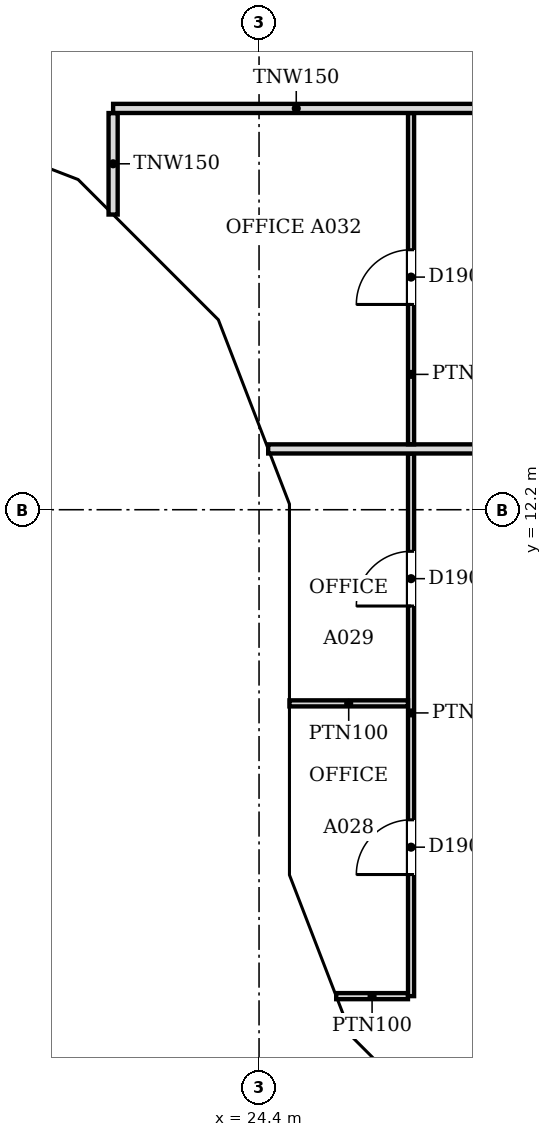
"""IFC4 building model, lengths in metres.
Left out: names, types, materials, properties, quantities, classifications, styles, units other than length and angle.
Written with IfcOpenShell. Run it as: python <this file> out.ifc"""

import sys

from ifc_helpers import new_model, si_unit, direction, frame, frame_2d, origin, place, context, subcontext, project, spatial, polyline, rectangle, outline, extrude, faceted_brep, source, transform, mapped, element, fill, save


model = new_model("IFC4")
c1 = context("Model", 3, precision=1e-05, world=origin(), true_north=direction((0.0, 1.0)))
c2 = subcontext(c1, "Body", "Model", "MODEL_VIEW")
j1 = project(units=[si_unit("LENGTHUNIT", "METRE"), si_unit("PLANEANGLEUNIT", "RADIAN")], contexts=[c1])
p1 = place(None, origin())
s1 = spatial("IfcSite", under=j1, at=p1, CompositionType="ELEMENT")
p2 = place(p1, origin())
s2 = spatial("IfcBuilding", under=s1, at=p2, CompositionType="ELEMENT")
p3 = place(p2, frame((0.0, 0.0, 159.2)))
s3 = spatial("IfcBuildingStorey", under=s2, at=p3, CompositionType="ELEMENT", Elevation=159.2)
m1 = source(origin(), c2, "Body", "Brep", [
    faceted_brep([(3.096, -0.25, 7.536), (0.047, -0.25, 3.856), (0.047, -0.25, 3.744), (3.096, -0.25, 0.064), (0.0, 0.25, 3.8), (3.149, 0.25, 7.6), (3.202, 0.25, 7.536), (3.202, 0.25, 0.064), (3.149, 0.25, 0.0), (3.149, -0.0, 0.0), (3.149, -0.0, 7.6), (0.0, 0.0, 3.8)], [[[0, 1, 2, 3]], [[4, 5, 6, 7, 8]], [[8, 7, 9]], [[6, 5, 10]], [[5, 4, 11, 1, 0, 10]], [[4, 8, 9, 3, 2, 11]], [[11, 2, 1]], [[3, 9, 7, 6, 10, 0]]]),
])
p4 = place(p3, frame((18.346, 18.55, -3.8), z_axis=(0.0, 0.0, 1.0), x_axis=(0.932985567668, -0.359913782069, 0.0)))
e1 = element("IfcWall", 1, at=p4, inside=s3, PredefinedType="SOLIDWALL", context=c2, shape_type="MappedRepresentation", body=[
    mapped(m1, transform((0.0, 0.0, 0.0), scale=1.0)),
])
m2 = source(origin(), c2, "Body", "SweptSolid", [
    extrude(outline(polyline([(2.949, 6.967), (0.325, 3.8), (2.949, 0.633), (2.949, 6.967)])), frame((0.0, 0.26, 0.0), z_axis=(0.0, -1.0, 0.0), x_axis=(1.0, 0.0, 0.0)), (0.0, 0.0, 1.0), 0.52),
])
p5 = place(p4, origin())
e2 = element("IfcOpeningElement", 2, at=p5, cuts=e1, PredefinedType="OPENING", context=c2, shape_type="MappedRepresentation", body=[
    mapped(m2, transform((0.0, 0.0, 0.0), scale=1.0)),
])
m3 = source(origin(), c2, "Body", "Brep", [
    faceted_brep([(0.106, -0.25, 0.064), (3.156, -0.25, 3.736), (3.156, -0.25, 3.864), (0.106, -0.25, 7.536), (0.0, 0.25, 7.536), (0.053, 0.25, 7.6), (3.209, 0.25, 3.8), (0.053, 0.25, 0.0), (0.0, 0.25, 0.064), (3.209, -0.0, 3.8), (0.053, 0.0, 0.0), (0.053, 0.0, 7.6)], [[[0, 1, 2, 3]], [[4, 5, 6, 7, 8]], [[7, 6, 9, 1, 0, 10]], [[6, 5, 11, 3, 2, 9]], [[5, 4, 11]], [[8, 7, 10]], [[8, 10, 0, 3, 11, 4]], [[1, 9, 2]]]),
])
p6 = place(p3, frame((21.248, 17.454, -3.8), z_axis=(0.0, 0.0, 1.0), x_axis=(0.707106781187, -0.707106781187, 0.0)))
e3 = element("IfcWall", 3, at=p6, inside=s3, PredefinedType="SOLIDWALL", context=c2, shape_type="MappedRepresentation", body=[
    mapped(m3, transform((0.0, 0.0, 0.0), scale=1.0)),
])
m4 = source(origin(), c2, "Body", "SweptSolid", [
    extrude(outline(polyline([(0.253, 0.632), (2.884, 3.8), (0.253, 6.968), (0.253, 0.632)])), frame((0.0, 0.26, 0.0), z_axis=(0.0, -1.0, 0.0), x_axis=(1.0, 0.0, 0.0)), (0.0, 0.0, 1.0), 0.52),
])
p7 = place(p6, origin())
e4 = element("IfcOpeningElement", 4, at=p7, cuts=e3, PredefinedType="OPENING", context=c2, shape_type="MappedRepresentation", body=[
    mapped(m4, transform((0.0, 0.0, 0.0), scale=1.0)),
])
m5 = source(origin(), c2, "Body", "Brep", [
    faceted_brep([(3.103, -0.25, 7.544), (0.053, -0.25, 3.864), (0.053, -0.25, 3.736), (3.103, -0.25, 0.056), (0.0, 0.25, 3.8), (3.149, 0.25, 7.6), (3.196, 0.25, 7.543), (3.196, 0.25, 0.057), (3.149, 0.25, 0.0), (3.149, -0.0, 0.0), (3.149, -0.0, 7.6), (0.0, 0.0, 3.8)], [[[0, 1, 2, 3]], [[4, 5, 6, 7, 8]], [[8, 7, 9]], [[6, 5, 10]], [[5, 4, 11, 1, 0, 10]], [[4, 8, 9, 3, 2, 11]], [[11, 2, 1]], [[3, 9, 7, 6, 10, 0]]]),
])
p8 = place(p3, frame((23.517, 15.185, -3.8), z_axis=(0.0, 0.0, 1.0), x_axis=(0.359864468756, -0.933004589553, 0.0)))
e5 = element("IfcWall", 5, at=p8, inside=s3, PredefinedType="SOLIDWALL", context=c2, shape_type="MappedRepresentation", body=[
    mapped(m5, transform((0.0, 0.0, 0.0), scale=1.0)),
])
p9 = place(p8, origin())
e6 = element("IfcOpeningElement", 6, at=p9, cuts=e5, PredefinedType="OPENING", context=c2, shape_type="MappedRepresentation", body=[
    mapped(m2, transform((0.0, 0.0, 0.0), scale=1.0)),
])
m6 = source(origin(), c2, "Body", "Brep", [
    faceted_brep([(0.093, -0.25, 0.057), (3.143, -0.25, 3.8), (0.093, -0.25, 7.543), (0.0, 0.25, 7.544), (0.047, 0.25, 7.6), (3.143, 0.25, 3.8), (0.047, 0.25, 0.0), (0.0, 0.25, 0.056), (0.047, 0.0, 0.0), (0.047, 0.0, 7.6)], [[[0, 1, 2]], [[3, 4, 5, 6, 7]], [[6, 5, 1, 0, 8]], [[5, 4, 9, 2, 1]], [[4, 3, 9]], [[7, 6, 8]], [[7, 8, 0, 2, 9, 3]]]),
])
p10 = place(p3, frame((24.65, 12.293, -3.8), z_axis=(0.0, 0.0, 1.0), x_axis=(0.0, -1.0, 0.0)))
e7 = element("IfcWall", 7, at=p10, inside=s3, PredefinedType="SOLIDWALL", context=c2, shape_type="MappedRepresentation", body=[
    mapped(m6, transform((0.0, 0.0, 0.0), scale=1.0)),
])
m7 = source(origin(), c2, "Body", "SweptSolid", [
    extrude(outline(polyline([(0.247, 0.641), (2.821, 3.8), (0.247, 6.959), (0.247, 0.641)])), frame((0.0, 0.26, 0.0), z_axis=(0.0, -1.0, 0.0), x_axis=(1.0, 0.0, 0.0)), (0.0, 0.0, 1.0), 0.52),
])
p11 = place(p10, origin())
e8 = element("IfcOpeningElement", 8, at=p11, cuts=e7, PredefinedType="OPENING", context=c2, shape_type="MappedRepresentation", body=[
    mapped(m7, transform((0.0, 0.0, 0.0), scale=1.0)),
])
m8 = source(origin(), c2, "Body", "Brep", [
    faceted_brep([(3.003, -0.25, 0.0), (3.05, -0.25, 0.06), (3.05, -0.25, 7.54), (3.003, -0.25, 7.6), (0.0, -0.25, 3.8), (0.0, 0.25, 3.8), (2.957, 0.25, 7.541), (2.957, 0.25, 0.059), (3.003, 0.0, 0.0), (3.003, 0.0, 7.6)], [[[0, 1, 2, 3, 4]], [[5, 6, 7]], [[1, 0, 8]], [[9, 3, 2]], [[6, 5, 4, 3, 9]], [[5, 7, 8, 0, 4]], [[1, 8, 7, 6, 9, 2]]]),
])
p12 = place(p3, frame((24.65, 9.15, -3.8), z_axis=(0.0, 0.0, 1.0), x_axis=(0.0, -1.0, 0.0)))
e9 = element("IfcWall", 9, at=p12, inside=s3, PredefinedType="SOLIDWALL", context=c2, shape_type="MappedRepresentation", body=[
    mapped(m8, transform((0.0, 0.0, 0.0), scale=1.0)),
])
m9 = source(origin(), c2, "Body", "SweptSolid", [
    extrude(outline(polyline([(2.803, 6.944), (0.319, 3.8), (2.803, 0.656), (2.803, 6.944)])), frame((0.0, 0.26, 0.0), z_axis=(0.0, -1.0, 0.0), x_axis=(1.0, 0.0, 0.0)), (0.0, 0.0, 1.0), 0.52),
])
p13 = place(p12, origin())
e10 = element("IfcOpeningElement", 10, at=p13, cuts=e9, PredefinedType="OPENING", context=c2, shape_type="MappedRepresentation", body=[
    mapped(m9, transform((0.0, 0.0, 0.0), scale=1.0)),
])
m10 = source(origin(), c2, "Body", "Brep", [
    faceted_brep([(0.047, -0.25, 0.0), (2.997, -0.25, 3.8), (0.047, -0.25, 7.6), (0.0, -0.25, 7.541), (0.0, -0.25, 0.059), (0.093, 0.25, 7.54), (2.944, 0.25, 3.868), (2.944, 0.25, 3.732), (0.093, 0.25, 0.06), (2.997, 0.0, 3.8), (0.047, 0.0, 0.0), (0.047, 0.0, 7.6)], [[[0, 1, 2, 3, 4]], [[5, 6, 7, 8]], [[8, 7, 9, 1, 0, 10]], [[6, 5, 11, 2, 1, 9]], [[3, 2, 11]], [[10, 0, 4]], [[8, 10, 4, 3, 11, 5]], [[9, 7, 6]]]),
])
p14 = place(p3, frame((24.633, 6.19, -3.8), z_axis=(0.0, 0.0, 1.0), x_axis=(0.359901446078, -0.932990326376, 0.0)))
e11 = element("IfcWall", 11, at=p14, inside=s3, PredefinedType="SOLIDWALL", context=c2, shape_type="MappedRepresentation", body=[
    mapped(m10, transform((0.0, 0.0, 0.0), scale=1.0)),
])
m11 = source(origin(), c2, "Body", "SweptSolid", [
    extrude(outline(polyline([(0.247, 0.665), (2.681, 3.8), (0.247, 6.935), (0.247, 0.665)])), frame((0.0, 0.26, 0.0), z_axis=(0.0, -1.0, 0.0), x_axis=(1.0, 0.0, 0.0)), (0.0, 0.0, 1.0), 0.52),
])
p15 = place(p14, origin())
e12 = element("IfcOpeningElement", 12, at=p15, cuts=e11, PredefinedType="OPENING", context=c2, shape_type="MappedRepresentation", body=[
    mapped(m11, transform((0.0, 0.0, 0.0), scale=1.0)),
])
m12 = source(origin(), c2, "Body", "Brep", [
    faceted_brep([(2.944, -0.25, 0.0), (2.997, -0.25, 0.068), (2.997, -0.25, 7.532), (2.944, -0.25, 7.6), (0.0, -0.25, 3.8), (0.053, 0.25, 3.868), (2.891, 0.25, 7.532), (2.891, 0.25, 0.068), (0.053, 0.25, 3.732), (2.944, 0.0, 0.0), (2.944, 0.0, 7.6), (0.0, 0.0, 3.8)], [[[0, 1, 2, 3, 4]], [[5, 6, 7, 8]], [[1, 0, 9]], [[10, 3, 2]], [[6, 5, 11, 4, 3, 10]], [[8, 7, 9, 0, 4, 11]], [[8, 11, 5]], [[1, 9, 7, 6, 10, 2]]]),
])
p16 = place(p3, frame((25.712, 3.394, -3.8), z_axis=(0.0, 0.0, 1.0), x_axis=(0.707066050402, -0.707147509625, 0.0)))
e13 = element("IfcWall", 13, at=p16, inside=s3, PredefinedType="SOLIDWALL", context=c2, shape_type="MappedRepresentation", body=[
    mapped(m12, transform((0.0, 0.0, 0.0), scale=1.0)),
])
m13 = source(origin(), c2, "Body", "SweptSolid", [
    extrude(outline(polyline([(2.744, 6.934), (0.316, 3.8), (2.744, 0.667), (2.744, 6.934)])), frame((0.0, 0.26, 0.0), z_axis=(0.0, -1.0, 0.0), x_axis=(1.0, 0.0, 0.0)), (0.0, 0.0, 1.0), 0.52),
])
p17 = place(p16, origin())
e14 = element("IfcOpeningElement", 14, at=p17, cuts=e13, PredefinedType="OPENING", context=c2, shape_type="MappedRepresentation", body=[
    mapped(m13, transform((0.0, 0.0, 0.0), scale=1.0)),
])
p18 = place(p2, frame((0.0, 0.0, 163.0)))
s4 = spatial("IfcBuildingStorey", under=s2, at=p18, CompositionType="ELEMENT", Elevation=163.0)
m14 = source(origin(), c2, "Body", "Brep", [
    faceted_brep([(0.093, -0.25, 0.056), (3.143, -0.25, 3.736), (3.143, -0.25, 3.864), (0.093, -0.25, 7.544), (0.0, 0.25, 7.543), (0.047, 0.25, 7.6), (3.196, 0.25, 3.8), (0.047, 0.25, 0.0), (0.0, 0.25, 0.057), (3.196, -0.0, 3.8), (0.047, 0.0, 0.0), (0.047, 0.0, 7.6)], [[[0, 1, 2, 3]], [[4, 5, 6, 7, 8]], [[7, 6, 9, 1, 0, 10]], [[6, 5, 11, 3, 2, 9]], [[5, 4, 11]], [[8, 7, 10]], [[8, 10, 0, 3, 11, 4]], [[1, 9, 2]]]),
])
p19 = place(p18, frame((18.303, 18.567, -3.8), z_axis=(0.0, 0.0, 1.0), x_axis=(0.932978940178, -0.359930961693, 0.0)))
e15 = element("IfcWall", 15, at=p19, inside=s4, PredefinedType="SOLIDWALL", context=c2, shape_type="MappedRepresentation", body=[
    mapped(m14, transform((0.0, 0.0, 0.0), scale=1.0)),
])
m15 = source(origin(), c2, "Body", "SweptSolid", [
    extrude(outline(polyline([(0.247, 0.633), (2.871, 3.8), (0.247, 6.967), (0.247, 0.633)])), frame((0.0, 0.26, 0.0), z_axis=(0.0, -1.0, 0.0), x_axis=(1.0, 0.0, 0.0)), (0.0, 0.0, 1.0), 0.52),
])
p20 = place(p19, origin())
e16 = element("IfcOpeningElement", 16, at=p20, cuts=e15, PredefinedType="OPENING", context=c2, shape_type="MappedRepresentation", body=[
    mapped(m15, transform((0.0, 0.0, 0.0), scale=1.0)),
])
m16 = source(origin(), c2, "Body", "Brep", [
    faceted_brep([(3.103, -0.25, 7.536), (0.053, -0.25, 3.864), (0.053, -0.25, 3.736), (3.103, -0.25, 0.064), (0.0, 0.25, 3.8), (3.156, 0.25, 7.6), (3.209, 0.25, 7.536), (3.209, 0.25, 0.064), (3.156, 0.25, 0.0), (3.156, -0.0, 0.0), (3.156, -0.0, 7.6), (0.0, 0.0, 3.8)], [[[0, 1, 2, 3]], [[4, 5, 6, 7, 8]], [[8, 7, 9]], [[6, 5, 10]], [[5, 4, 11, 1, 0, 10]], [[4, 8, 9, 3, 2, 11]], [[11, 2, 1]], [[3, 9, 7, 6, 10, 0]]]),
])
p21 = place(p18, frame((21.285, 17.417, -3.8), z_axis=(0.0, 0.0, 1.0), x_axis=(0.707106781187, -0.707106781187, 0.0)))
e17 = element("IfcWall", 17, at=p21, inside=s4, PredefinedType="SOLIDWALL", context=c2, shape_type="MappedRepresentation", body=[
    mapped(m16, transform((0.0, 0.0, 0.0), scale=1.0)),
])
m17 = source(origin(), c2, "Body", "SweptSolid", [
    extrude(outline(polyline([(2.956, 6.968), (0.325, 3.8), (2.956, 0.632), (2.956, 6.968)])), frame((0.0, 0.26, 0.0), z_axis=(0.0, -1.0, 0.0), x_axis=(1.0, 0.0, 0.0)), (0.0, 0.0, 1.0), 0.52),
])
p22 = place(p21, origin())
e18 = element("IfcOpeningElement", 18, at=p22, cuts=e17, PredefinedType="OPENING", context=c2, shape_type="MappedRepresentation", body=[
    mapped(m17, transform((0.0, 0.0, 0.0), scale=1.0)),
])
m18 = source(origin(), c2, "Body", "Brep", [
    faceted_brep([(0.106, -0.25, 0.064), (3.156, -0.25, 3.744), (3.156, -0.25, 3.856), (0.106, -0.25, 7.536), (0.0, 0.25, 7.536), (0.053, 0.25, 7.6), (3.202, 0.25, 3.8), (0.053, 0.25, 0.0), (0.0, 0.25, 0.064), (3.202, -0.0, 3.8), (0.053, 0.0, 0.0), (0.053, 0.0, 7.6)], [[[0, 1, 2, 3]], [[4, 5, 6, 7, 8]], [[7, 6, 9, 1, 0, 10]], [[6, 5, 11, 3, 2, 9]], [[5, 4, 11]], [[8, 7, 10]], [[8, 10, 0, 3, 11, 4]], [[1, 9, 2]]]),
])
p23 = place(p18, frame((23.497, 15.234, -3.8), z_axis=(0.0, 0.0, 1.0), x_axis=(0.359913782069, -0.932985567668, 0.0)))
e19 = element("IfcWall", 19, at=p23, inside=s4, PredefinedType="SOLIDWALL", context=c2, shape_type="MappedRepresentation", body=[
    mapped(m18, transform((0.0, 0.0, 0.0), scale=1.0)),
])
m19 = source(origin(), c2, "Body", "SweptSolid", [
    extrude(outline(polyline([(0.253, 0.633), (2.878, 3.8), (0.253, 6.967), (0.253, 0.633)])), frame((0.0, 0.26, 0.0), z_axis=(0.0, -1.0, 0.0), x_axis=(1.0, 0.0, 0.0)), (0.0, 0.0, 1.0), 0.52),
])
p24 = place(p23, origin())
e20 = element("IfcOpeningElement", 20, at=p24, cuts=e19, PredefinedType="OPENING", context=c2, shape_type="MappedRepresentation", body=[
    mapped(m19, transform((0.0, 0.0, 0.0), scale=1.0)),
])
m20 = source(origin(), c2, "Body", "Brep", [
    faceted_brep([(3.096, -0.25, 0.0), (6.1, -0.25, 3.8), (3.096, -0.25, 7.6), (0.047, -0.25, 3.857), (0.047, -0.25, 3.743), (0.0, 0.25, 3.8), (3.096, 0.25, 7.6), (6.053, 0.25, 3.859), (6.053, 0.25, 3.741), (3.096, 0.25, 0.0), (6.1, -0.0, 3.8), (0.0, 0.0, 3.8)], [[[0, 1, 2, 3, 4]], [[5, 6, 7, 8, 9]], [[9, 8, 10, 1, 0]], [[7, 6, 2, 1, 10]], [[6, 5, 11, 3, 2]], [[5, 9, 0, 4, 11]], [[11, 4, 3]], [[10, 8, 7]]]),
])
p25 = place(p18, frame((24.65, 12.247, -3.8), z_axis=(0.0, 0.0, 1.0), x_axis=(0.0, -1.0, 0.0)))
e21 = element("IfcWall", 21, at=p25, inside=s4, PredefinedType="SOLIDWALL", context=c2, shape_type="MappedRepresentation", body=[
    mapped(m20, transform((0.0, 0.0, 0.0), scale=1.0)),
])
m21 = source(origin(), c2, "Body", "SweptSolid", [
    extrude(outline(polyline([(3.094, 0.399), (5.781, 3.8), (3.094, 7.201), (0.323, 3.8), (3.094, 0.399)])), frame((0.0, 0.26, 0.0), z_axis=(0.0, -1.0, 0.0), x_axis=(1.0, 0.0, 0.0)), (0.0, 0.0, 1.0), 0.52),
])
p26 = place(p25, origin())
e22 = element("IfcOpeningElement", 22, at=p26, cuts=e21, PredefinedType="OPENING", context=c2, shape_type="MappedRepresentation", body=[
    mapped(m21, transform((0.0, 0.0, 0.0), scale=1.0)),
])
m22 = source(origin(), c2, "Body", "Brep", [
    faceted_brep([(2.95, -0.25, 0.0), (3.003, -0.25, 0.068), (3.003, -0.25, 7.532), (2.95, -0.25, 7.6), (0.0, -0.25, 3.8), (0.047, 0.25, 3.86), (2.898, 0.25, 7.532), (2.898, 0.25, 0.068), (0.047, 0.25, 3.74), (2.95, 0.0, 0.0), (2.95, 0.0, 7.6), (0.0, 0.0, 3.8)], [[[0, 1, 2, 3, 4]], [[5, 6, 7, 8]], [[1, 0, 9]], [[10, 3, 2]], [[6, 5, 11, 4, 3, 10]], [[8, 7, 9, 0, 4, 11]], [[8, 11, 5]], [[1, 9, 7, 6, 10, 2]]]),
])
p27 = place(p18, frame((24.65, 6.146, -3.8), z_axis=(0.0, 0.0, 1.0), x_axis=(0.359953949349, -0.932970071518, 0.0)))
e23 = element("IfcWall", 23, at=p27, inside=s4, PredefinedType="SOLIDWALL", context=c2, shape_type="MappedRepresentation", body=[
    mapped(m22, transform((0.0, 0.0, 0.0), scale=1.0)),
])
m23 = source(origin(), c2, "Body", "SweptSolid", [
    extrude(outline(polyline([(2.75, 6.935), (0.316, 3.8), (2.75, 0.665), (2.75, 6.935)])), frame((0.0, 0.26, 0.0), z_axis=(0.0, -1.0, 0.0), x_axis=(1.0, 0.0, 0.0)), (0.0, 0.0, 1.0), 0.52),
])
p28 = place(p27, origin())
e24 = element("IfcOpeningElement", 24, at=p28, cuts=e23, PredefinedType="OPENING", context=c2, shape_type="MappedRepresentation", body=[
    mapped(m23, transform((0.0, 0.0, 0.0), scale=1.0)),
])
m24 = source(origin(), c2, "Body", "Brep", [
    faceted_brep([(0.053, -0.25, 0.0), (2.997, -0.25, 3.8), (0.053, -0.25, 7.6), (0.0, -0.25, 7.532), (0.0, -0.25, 0.068), (0.106, 0.25, 7.532), (2.944, 0.25, 3.868), (2.944, 0.25, 3.732), (0.106, 0.25, 0.068), (2.997, 0.0, 3.8), (0.053, 0.0, 0.0), (0.053, 0.0, 7.6)], [[[0, 1, 2, 3, 4]], [[5, 6, 7, 8]], [[8, 7, 9, 1, 0, 10]], [[6, 5, 11, 2, 1, 9]], [[3, 2, 11]], [[10, 0, 4]], [[8, 10, 4, 3, 11, 5]], [[9, 7, 6]]]),
])
p29 = place(p18, frame((25.675, 3.431, -3.8), z_axis=(0.0, 0.0, 1.0), x_axis=(0.707106781187, -0.707106781187, 0.0)))
e25 = element("IfcWall", 25, at=p29, inside=s4, PredefinedType="SOLIDWALL", context=c2, shape_type="MappedRepresentation", body=[
    mapped(m24, transform((0.0, 0.0, 0.0), scale=1.0)),
])
m25 = source(origin(), c2, "Body", "SweptSolid", [
    extrude(outline(polyline([(0.253, 0.666), (2.681, 3.8), (0.253, 6.934), (0.253, 0.666)])), frame((0.0, 0.26, 0.0), z_axis=(0.0, -1.0, 0.0), x_axis=(1.0, 0.0, 0.0)), (0.0, 0.0, 1.0), 0.52),
])
p30 = place(p29, origin())
e26 = element("IfcOpeningElement", 26, at=p30, cuts=e25, PredefinedType="OPENING", context=c2, shape_type="MappedRepresentation", body=[
    mapped(m25, transform((0.0, 0.0, 0.0), scale=1.0)),
])
p31 = place(p3, frame((25.669, 4.2, 0.0), z_axis=(0.0, 0.0, 1.0), x_axis=(1.0, 0.0, 0.0)))
e27 = element("IfcWall", 27, at=p31, inside=s3, PredefinedType="PARTITIONING", context=c2, shape_type="SweptSolid", body=[
    extrude(rectangle(XDim=1.18, YDim=0.1, at=frame_2d((0.59, 0.0))), origin(), (0.0, 0.0, 1.0), 3.067),
])
p32 = place(p3, frame((26.9, 4.2, 0.0), z_axis=(0.0, 0.0, 1.0), x_axis=(0.0, 1.0, 0.0)))
e28 = element("IfcWall", 28, at=p32, inside=s3, PredefinedType="PARTITIONING", context=c2, shape_type="SweptSolid", body=[
    extrude(rectangle(XDim=8.924, YDim=0.1, at=frame_2d((4.462, 0.0))), origin(), (0.0, 0.0, 1.0), 3.067),
])
m26 = source(origin(), c2, "Body", "SweptSolid", [
    extrude(rectangle(XDim=0.9, YDim=2.1, at=frame_2d((0.45, 1.05))), frame((0.0, 0.06, 0.0), z_axis=(0.0, -1.0, 0.0), x_axis=(1.0, 0.0, 0.0)), (0.0, 0.0, 1.0), 0.12),
])
p33 = place(p32, frame((6.416, 0.0, 0.0)))
e29 = element("IfcOpeningElement", 29, at=p33, cuts=e28, PredefinedType="OPENING", context=c2, shape_type="MappedRepresentation", body=[
    mapped(m26, transform((0.0, 0.0, 0.0), scale=1.0)),
])
p34 = place(p32, frame((2.0, 0.0, 0.0)))
e30 = element("IfcOpeningElement", 30, at=p34, cuts=e28, PredefinedType="OPENING", context=c2, shape_type="MappedRepresentation", body=[
    mapped(m26, transform((0.0, 0.0, 0.0), scale=1.0)),
])
p35 = place(p3, frame((24.9, 9.015, 0.0), z_axis=(0.0, 0.0, 1.0), x_axis=(1.0, 0.0, 0.0)))
e31 = element("IfcWall", 31, at=p35, inside=s3, PredefinedType="PARTITIONING", context=c2, shape_type="SweptSolid", body=[
    extrude(rectangle(XDim=1.949, YDim=0.1, at=frame_2d((0.975, 0.0))), origin(), (0.0, 0.0, 1.0), 3.067),
])
p36 = place(p3, frame((24.55, 13.2, 0.0), z_axis=(0.0, 0.0, 1.0), x_axis=(1.0, 0.0, 0.0)))
e32 = element("IfcWall", 32, at=p36, inside=s3, PredefinedType="PARTITIONING", context=c2, shape_type="SweptSolid", body=[
    extrude(rectangle(XDim=15.249, YDim=0.15, at=frame_2d((7.625, 0.0))), origin(), (0.0, 0.0, 1.0), 3.067),
])
p37 = place(p3, frame((26.9, 13.276, 0.0), z_axis=(0.0, 0.0, 1.0), x_axis=(0.0, 1.0, 0.0)))
e33 = element("IfcWall", 33, at=p37, inside=s3, PredefinedType="PARTITIONING", context=c2, shape_type="SweptSolid", body=[
    extrude(rectangle(XDim=5.448, YDim=0.1, at=frame_2d((2.724, 0.0))), origin(), (0.0, 0.0, 1.0), 3.067),
])
p38 = place(p37, frame((2.3, 0.0, 0.0)))
e34 = element("IfcOpeningElement", 34, at=p38, cuts=e33, PredefinedType="OPENING", context=c2, shape_type="MappedRepresentation", body=[
    mapped(m26, transform((0.0, 0.0, 0.0), scale=1.0)),
])
p39 = place(p3, frame((22.0, 17.055, 0.0), z_axis=(0.0, 0.0, 1.0), x_axis=(0.0, 1.0, 0.0)))
e35 = element("IfcWall", 35, at=p39, inside=s3, PredefinedType="PARTITIONING", context=c2, shape_type="SweptSolid", body=[
    extrude(rectangle(XDim=1.669, YDim=0.15, at=frame_2d((0.834, 0.0))), origin(), (0.0, 0.0, 1.0), 3.067),
])
p40 = place(p3, frame((22.0, 18.8, 0.0), z_axis=(0.0, 0.0, 1.0), x_axis=(1.0, 0.0, 0.0)))
e36 = element("IfcWall", 36, at=p40, inside=s3, PredefinedType="PARTITIONING", context=c2, shape_type="SweptSolid", body=[
    extrude(rectangle(XDim=6.024, YDim=0.15, at=frame_2d((3.012, 0.0))), origin(), (0.0, 0.0, 1.0), 3.067),
])
m27 = source(origin(), c2, "Body", "SweptSolid", [
    extrude(rectangle(XDim=0.9, YDim=2.1, at=frame_2d((0.45, 1.05))), frame((0.0, 0.025, 0.0), z_axis=(0.0, -1.0, 0.0), x_axis=(1.0, 0.0, 0.0)), (0.0, 0.0, 1.0), 0.05),
])
p41 = place(p33, origin())
e37 = element("IfcDoor", 37, at=p41, inside=s3, OperationType="SINGLE_SWING_LEFT", PredefinedType="DOOR", context=c2, shape_type="MappedRepresentation", body=[
    mapped(m27, transform((0.0, 0.0, 0.0), scale=1.0)),
])
fill(e29, e37)
p42 = place(p38, origin())
e38 = element("IfcDoor", 38, at=p42, inside=s3, OperationType="SINGLE_SWING_LEFT", PredefinedType="DOOR", context=c2, shape_type="MappedRepresentation", body=[
    mapped(m27, transform((0.0, 0.0, 0.0), scale=1.0)),
])
fill(e34, e38)
p43 = place(p34, origin())
e39 = element("IfcDoor", 39, at=p43, inside=s3, OperationType="SINGLE_SWING_LEFT", PredefinedType="DOOR", context=c2, shape_type="MappedRepresentation", body=[
    mapped(m27, transform((0.0, 0.0, 0.0), scale=1.0)),
])
fill(e30, e39)
save(model, sys.argv[1])
